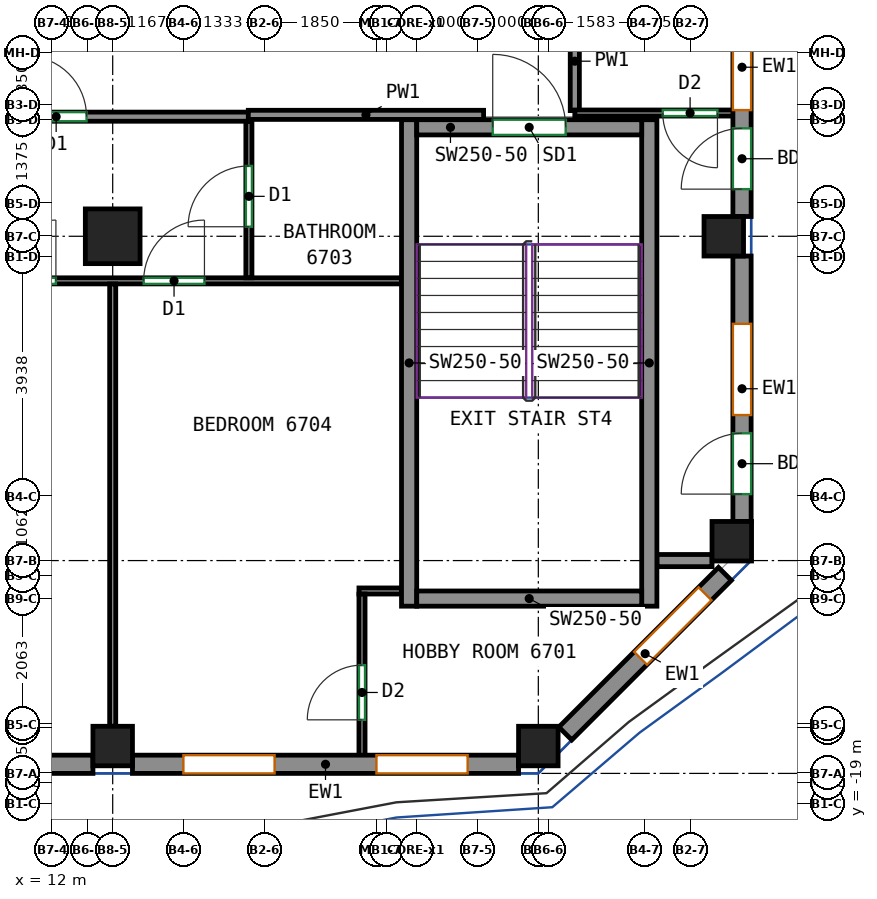
"""IFC4 building model, lengths in metres.
Left out: names, types, materials, properties, quantities, classifications, styles, units other than length and angle.
Written with IfcOpenShell. Run it as: python <this file> out.ifc"""

import sys

from ifc_helpers import new_model, si_unit, direction, frame, frame_2d, origin, origin_2d, place, context, subcontext, project, spatial, rectangle, extrude, source, transform, mapped, element, fill, save


model = new_model("IFC4")
c1 = context("Model", 3, precision=1e-05, world=origin(), true_north=direction((0.0, 1.0)))
c2 = subcontext(c1, "Body", "Model", "MODEL_VIEW")
j1 = project(units=[si_unit("LENGTHUNIT", "METRE"), si_unit("PLANEANGLEUNIT", "RADIAN")], contexts=[c1])
p1 = place(None, origin())
s1 = spatial("IfcSite", under=j1, at=p1, CompositionType="ELEMENT")
p2 = place(p1, origin())
s2 = spatial("IfcBuilding", under=s1, at=p2, CompositionType="ELEMENT")
p3 = place(p2, frame((0.0, 0.0, 273.8)))
s3 = spatial("IfcBuildingStorey", under=s2, at=p3, CompositionType="ELEMENT", Elevation=273.8)
m1 = source(origin(), c2, "Body", "SweptSolid", [
    extrude(rectangle(XDim=0.65, YDim=0.65, at=origin_2d()), origin(), (0.0, 0.0, 1.0), 3.12),
])
p4 = place(p3, frame((13.0, -18.05, 0.0), z_axis=(0.0, 0.0, 1.0), x_axis=(1.0, 0.0, 0.0)))
e1 = element("IfcColumn", 1, at=p4, inside=s3, PredefinedType="COLUMN", context=c2, shape_type="MappedRepresentation", body=[
    mapped(m1, transform((0.0, 0.0, 0.0))),
])
m2 = source(origin(), c2, "Body", "SweptSolid", [
    extrude(rectangle(XDim=0.9, YDim=0.9, at=origin_2d()), origin(), (0.0, 0.0, 1.0), 3.12),
])
p5 = place(p3, frame((13.0, -9.667, 0.0), z_axis=(0.0, 0.0, 1.0), x_axis=(1.0, 0.0, 0.0)))
e2 = element("IfcColumn", 2, at=p5, inside=s3, PredefinedType="COLUMN", context=c2, shape_type="MappedRepresentation", body=[
    mapped(m2, transform((0.0, 0.0, 0.0))),
])
for number, where, z_axis, x_axis in (
    (3, (20.0, -18.05, 0.0), (0.0, 0.0, 1.0), (1.0, 0.0, 0.0)),
    (4, (23.05, -9.667, 0.0), (0.0, 0.0, 1.0), (1.0, 0.0, 0.0)),
    (5, (23.182, -14.682, 0.0), (0.0, 0.0, 1.0), (1.0, 0.0, 0.0)),
):
    element("IfcColumn", number, at=place(p3, frame(where, z_axis=z_axis, x_axis=x_axis)), inside=s3, PredefinedType="COLUMN", context=c2, shape_type="MappedRepresentation", body=[
        mapped(m1, transform((0.0, 0.0, 0.0))),
    ])
m3 = source(origin(), c2, "Body", "SweptSolid", [
    extrude(rectangle(XDim=8.0, YDim=0.25, at=frame_2d((4.0, 0.0))), origin(), (0.0, 0.0, 1.0), 3.12),
])
for number, where, z_axis, x_axis in (
    (6, (17.875, -15.75, 0.0), (0.0, 0.0, 1.0), (0.0, 1.0, 0.0)),
    (7, (21.825, -15.75, 0.0), (0.0, 0.0, 1.0), (0.0, 1.0, 0.0)),
):
    element("IfcWall", number, at=place(p3, frame(where, z_axis=z_axis, x_axis=x_axis)), inside=s3, PredefinedType="SHEAR", context=c2, shape_type="MappedRepresentation", body=[
        mapped(m3, transform((0.0, 0.0, 0.0))),
    ])
m4 = source(origin(), c2, "Body", "SweptSolid", [
    extrude(rectangle(XDim=3.7, YDim=0.25, at=frame_2d((1.85, 0.0))), origin(), (0.0, 0.0, 1.0), 3.12),
])
p6 = place(p3, frame((18.0, -15.625, 0.0), z_axis=(0.0, 0.0, 1.0), x_axis=(1.0, 0.0, 0.0)))
e8 = element("IfcWall", 8, at=p6, inside=s3, PredefinedType="SHEAR", context=c2, shape_type="MappedRepresentation", body=[
    mapped(m4, transform((0.0, 0.0, 0.0))),
])
p7 = place(p3, frame((18.0, -7.875, 0.0), z_axis=(0.0, 0.0, 1.0), x_axis=(1.0, 0.0, 0.0)))
e9 = element("IfcWall", 9, at=p7, inside=s3, PredefinedType="SHEAR", context=c2, shape_type="MappedRepresentation", body=[
    mapped(m4, transform((0.0, 0.0, 0.0))),
])
p8 = place(p7, frame((1.25, 0.0, 0.0)))
e10 = element("IfcOpeningElement", 10, at=p8, cuts=e9, PredefinedType="OPENING", context=c2, shape_type="SweptSolid", body=[
    extrude(rectangle(XDim=1.2, YDim=2.1, at=frame_2d((0.6, 1.05))), frame((0.0, 0.135, 0.0), z_axis=(0.0, -1.0, 0.0), x_axis=(1.0, 0.0, 0.0)), (0.0, 0.0, 1.0), 0.27),
])
m5 = source(origin(), c2, "Body", "SweptSolid", [
    extrude(rectangle(XDim=6.35, YDim=0.3, at=frame_2d((3.175, 0.0))), origin(), (0.0, 0.0, 1.0), 3.12),
])
p9 = place(p3, frame((6.325, -18.35, 0.0), z_axis=(0.0, 0.0, 1.0), x_axis=(1.0, 0.0, 0.0)))
e11 = element("IfcWall", 11, at=p9, inside=s3, PredefinedType="SOLIDWALL", context=c2, shape_type="MappedRepresentation", body=[
    mapped(m5, transform((0.0, 0.0, 0.0))),
])
p10 = place(p9, frame((0.837, 0.0, 0.8)))
e12 = element("IfcOpeningElement", 12, at=p10, cuts=e11, PredefinedType="OPENING", context=c2, shape_type="SweptSolid", body=[
    extrude(rectangle(XDim=1.5, YDim=2.05, at=frame_2d((0.75, 1.025))), frame((0.0, 0.16, 0.0), z_axis=(0.0, -1.0, 0.0), x_axis=(1.0, 0.0, 0.0)), (0.0, 0.0, 1.0), 0.32),
])
p11 = place(p9, frame((4.012, 0.0, 0.8)))
e13 = element("IfcOpeningElement", 13, at=p11, cuts=e11, PredefinedType="OPENING", context=c2, shape_type="SweptSolid", body=[
    extrude(rectangle(XDim=1.5, YDim=2.05, at=frame_2d((0.75, 1.025))), frame((0.0, 0.16, 0.0), z_axis=(0.0, -1.0, 0.0), x_axis=(1.0, 0.0, 0.0)), (0.0, 0.0, 1.0), 0.32),
])
p12 = place(p3, frame((13.325, -18.35, 0.0), z_axis=(0.0, 0.0, 1.0), x_axis=(1.0, 0.0, 0.0)))
e14 = element("IfcWall", 14, at=p12, inside=s3, PredefinedType="SOLIDWALL", context=c2, shape_type="MappedRepresentation", body=[
    mapped(m5, transform((0.0, 0.0, 0.0))),
])
p13 = place(p12, frame((0.837, 0.0, 0.8)))
e15 = element("IfcOpeningElement", 15, at=p13, cuts=e14, PredefinedType="OPENING", context=c2, shape_type="SweptSolid", body=[
    extrude(rectangle(XDim=1.5, YDim=2.05, at=frame_2d((0.75, 1.025))), frame((0.0, 0.16, 0.0), z_axis=(0.0, -1.0, 0.0), x_axis=(1.0, 0.0, 0.0)), (0.0, 0.0, 1.0), 0.32),
])
p14 = place(p12, frame((4.012, 0.0, 0.8)))
e16 = element("IfcOpeningElement", 16, at=p14, cuts=e14, PredefinedType="OPENING", context=c2, shape_type="SweptSolid", body=[
    extrude(rectangle(XDim=1.5, YDim=2.05, at=frame_2d((0.75, 1.025))), frame((0.0, 0.16, 0.0), z_axis=(0.0, -1.0, 0.0), x_axis=(1.0, 0.0, 0.0)), (0.0, 0.0, 1.0), 0.32),
])
m6 = source(origin(), c2, "Body", "SweptSolid", [
    extrude(rectangle(XDim=3.712, YDim=0.3, at=frame_2d((1.856, 0.0))), origin(), (0.0, 0.0, 1.0), 3.12),
])
p15 = place(p3, frame((20.444, -17.844, 0.0), z_axis=(0.0, 0.0, 1.0), x_axis=(0.707106781187, 0.707106781187, 0.0)))
e17 = element("IfcWall", 17, at=p15, inside=s3, PredefinedType="SOLIDWALL", context=c2, shape_type="MappedRepresentation", body=[
    mapped(m6, transform((0.0, 0.0, 0.0))),
])
p16 = place(p15, frame((1.75, 0.0, 0.8)))
e18 = element("IfcOpeningElement", 18, at=p16, cuts=e17, PredefinedType="OPENING", context=c2, shape_type="SweptSolid", body=[
    extrude(rectangle(XDim=1.5, YDim=2.05, at=frame_2d((0.75, 1.025))), frame((0.0, 0.16, 0.0), z_axis=(0.0, -1.0, 0.0), x_axis=(1.0, 0.0, 0.0)), (0.0, 0.0, 1.0), 0.32),
])
m7 = source(origin(), c2, "Body", "SweptSolid", [
    extrude(rectangle(XDim=4.365, YDim=0.3, at=frame_2d((2.183, 0.0))), origin(), (0.0, 0.0, 1.0), 3.12),
])
p17 = place(p3, frame((23.35, -14.357, 0.0), z_axis=(0.0, 0.0, 1.0), x_axis=(0.0, 1.0, 0.0)))
e19 = element("IfcWall", 19, at=p17, inside=s3, PredefinedType="SOLIDWALL", context=c2, shape_type="MappedRepresentation", body=[
    mapped(m7, transform((0.0, 0.0, 0.0))),
])
p18 = place(p17, frame((1.75, 0.0, 0.8)))
e20 = element("IfcOpeningElement", 20, at=p18, cuts=e19, PredefinedType="OPENING", context=c2, shape_type="SweptSolid", body=[
    extrude(rectangle(XDim=1.5, YDim=2.05, at=frame_2d((0.75, 1.025))), frame((0.0, 0.16, 0.0), z_axis=(0.0, -1.0, 0.0), x_axis=(1.0, 0.0, 0.0)), (0.0, 0.0, 1.0), 0.32),
])
p19 = place(p17, frame((0.45, 0.0, 0.0)))
e21 = element("IfcOpeningElement", 21, at=p19, cuts=e19, PredefinedType="OPENING", context=c2, shape_type="SweptSolid", body=[
    extrude(rectangle(XDim=1.0, YDim=2.1, at=frame_2d((0.5, 1.05))), frame((0.0, 0.16, 0.0), z_axis=(0.0, -1.0, 0.0), x_axis=(1.0, 0.0, 0.0)), (0.0, 0.0, 1.0), 0.32),
])
m8 = source(origin(), c2, "Body", "SweptSolid", [
    extrude(rectangle(XDim=8.184, YDim=0.3, at=frame_2d((4.092, 0.0))), origin(), (0.0, 0.0, 1.0), 3.12),
])
p20 = place(p3, frame((23.35, -9.342, 0.0), z_axis=(0.0, 0.0, 1.0), x_axis=(0.0, 1.0, 0.0)))
e22 = element("IfcWall", 22, at=p20, inside=s3, PredefinedType="SOLIDWALL", context=c2, shape_type="MappedRepresentation", body=[
    mapped(m8, transform((0.0, 0.0, 0.0))),
])
p21 = place(p20, frame((1.75, 0.0, 0.8)))
e23 = element("IfcOpeningElement", 23, at=p21, cuts=e22, PredefinedType="OPENING", context=c2, shape_type="SweptSolid", body=[
    extrude(rectangle(XDim=1.5, YDim=2.05, at=frame_2d((0.75, 1.025))), frame((0.0, 0.16, 0.0), z_axis=(0.0, -1.0, 0.0), x_axis=(1.0, 0.0, 0.0)), (0.0, 0.0, 1.0), 0.32),
])
p22 = place(p20, frame((0.45, 0.0, 0.0)))
e24 = element("IfcOpeningElement", 24, at=p22, cuts=e22, PredefinedType="OPENING", context=c2, shape_type="SweptSolid", body=[
    extrude(rectangle(XDim=1.0, YDim=2.1, at=frame_2d((0.5, 1.05))), frame((0.0, 0.16, 0.0), z_axis=(0.0, -1.0, 0.0), x_axis=(1.0, 0.0, 0.0)), (0.0, 0.0, 1.0), 0.32),
])
p23 = place(p20, frame((5.842, 0.0, 0.8)))
e25 = element("IfcOpeningElement", 25, at=p23, cuts=e22, PredefinedType="OPENING", context=c2, shape_type="SweptSolid", body=[
    extrude(rectangle(XDim=1.5, YDim=2.05, at=frame_2d((0.75, 1.025))), frame((0.0, 0.16, 0.0), z_axis=(0.0, -1.0, 0.0), x_axis=(1.0, 0.0, 0.0)), (0.0, 0.0, 1.0), 0.32),
])
p24 = place(p20, frame((4.542, 0.0, 0.0)))
e26 = element("IfcOpeningElement", 26, at=p24, cuts=e22, PredefinedType="OPENING", context=c2, shape_type="SweptSolid", body=[
    extrude(rectangle(XDim=1.0, YDim=2.1, at=frame_2d((0.5, 1.05))), frame((0.0, 0.16, 0.0), z_axis=(0.0, -1.0, 0.0), x_axis=(1.0, 0.0, 0.0)), (0.0, 0.0, 1.0), 0.32),
])
p25 = place(p3, frame((-4.51, -7.7, 0.0), z_axis=(0.0, 0.0, 1.0), x_axis=(1.0, 0.0, 0.0)))
e27 = element("IfcWall", 27, at=p25, inside=s3, PredefinedType="PARTITIONING", context=c2, shape_type="SweptSolid", body=[
    extrude(rectangle(XDim=19.76, YDim=0.15, at=frame_2d((9.88, 0.0))), origin(), (0.0, 0.0, 1.0), 3.12),
])
p26 = place(p25, frame((3.566, 0.0, 0.0)))
e28 = element("IfcOpeningElement", 28, at=p26, cuts=e27, PredefinedType="OPENING", context=c2, shape_type="SweptSolid", body=[
    extrude(rectangle(XDim=1.0, YDim=2.1, at=frame_2d((0.5, 1.05))), frame((0.0, 0.085, 0.0), z_axis=(0.0, -1.0, 0.0), x_axis=(1.0, 0.0, 0.0)), (0.0, 0.0, 1.0), 0.17),
])
p27 = place(p25, frame((16.08, 0.0, 0.0)))
e29 = element("IfcOpeningElement", 29, at=p27, cuts=e27, PredefinedType="OPENING", context=c2, shape_type="SweptSolid", body=[
    extrude(rectangle(XDim=1.0, YDim=2.1, at=frame_2d((0.5, 1.05))), frame((0.0, 0.085, 0.0), z_axis=(0.0, -1.0, 0.0), x_axis=(1.0, 0.0, 0.0)), (0.0, 0.0, 1.0), 0.17),
])
p28 = place(p3, frame((15.23, -7.67, 0.0), z_axis=(0.0, 0.0, 1.0), x_axis=(1.0, 0.0, 0.0)))
e30 = element("IfcWall", 30, at=p28, inside=s3, PredefinedType="PARTITIONING", context=c2, shape_type="SweptSolid", body=[
    extrude(rectangle(XDim=3.87, YDim=0.15, at=frame_2d((1.935, 0.0))), origin(), (0.0, 0.0, 1.0), 3.12),
])
p29 = place(p3, frame((20.6, -7.6, 0.0), z_axis=(0.0, 0.0, 1.0), x_axis=(0.0, 1.0, 0.0)))
e31 = element("IfcWall", 31, at=p29, inside=s3, PredefinedType="PARTITIONING", context=c2, shape_type="SweptSolid", body=[
    extrude(rectangle(XDim=1.625, YDim=0.15, at=frame_2d((0.812, 0.0))), origin(), (0.0, 0.0, 1.0), 3.12),
])
p30 = place(p3, frame((-4.6, -10.4, 0.0), z_axis=(0.0, 0.0, 1.0), x_axis=(1.0, 0.0, 0.0)))
e32 = element("IfcWall", 32, at=p30, inside=s3, PredefinedType="PARTITIONING", context=c2, shape_type="SweptSolid", body=[
    extrude(rectangle(XDim=22.35, YDim=0.1, at=frame_2d((11.175, 0.0))), origin(), (0.0, 0.0, 1.0), 3.12),
])
p31 = place(p30, frame((3.96, 0.0, 0.0)))
e33 = element("IfcOpeningElement", 33, at=p31, cuts=e32, PredefinedType="OPENING", context=c2, shape_type="SweptSolid", body=[
    extrude(rectangle(XDim=1.0, YDim=2.1, at=frame_2d((0.5, 1.05))), frame((0.0, 0.06, 0.0), z_axis=(0.0, -1.0, 0.0), x_axis=(1.0, 0.0, 0.0)), (0.0, 0.0, 1.0), 0.12),
])
p32 = place(p30, frame((15.666, 0.0, 0.0)))
e34 = element("IfcOpeningElement", 34, at=p32, cuts=e32, PredefinedType="OPENING", context=c2, shape_type="SweptSolid", body=[
    extrude(rectangle(XDim=1.0, YDim=2.1, at=frame_2d((0.5, 1.05))), frame((0.0, 0.06, 0.0), z_axis=(0.0, -1.0, 0.0), x_axis=(1.0, 0.0, 0.0)), (0.0, 0.0, 1.0), 0.12),
])
p33 = place(p30, frame((18.109, 0.0, 0.0)))
e35 = element("IfcOpeningElement", 35, at=p33, cuts=e32, PredefinedType="OPENING", context=c2, shape_type="SweptSolid", body=[
    extrude(rectangle(XDim=1.0, YDim=2.1, at=frame_2d((0.5, 1.05))), frame((0.0, 0.06, 0.0), z_axis=(0.0, -1.0, 0.0), x_axis=(1.0, 0.0, 0.0)), (0.0, 0.0, 1.0), 0.12),
])
p34 = place(p3, frame((15.24, -10.35, 0.0), z_axis=(0.0, 0.0, 1.0), x_axis=(0.0, 1.0, 0.0)))
e36 = element("IfcWall", 36, at=p34, inside=s3, PredefinedType="PARTITIONING", context=c2, shape_type="SweptSolid", body=[
    extrude(rectangle(XDim=2.573, YDim=0.1, at=frame_2d((1.287, 0.0))), origin(), (0.0, 0.0, 1.0), 3.12),
])
p35 = place(p34, frame((0.84, 0.0, 0.0)))
e37 = element("IfcOpeningElement", 37, at=p35, cuts=e36, PredefinedType="OPENING", context=c2, shape_type="SweptSolid", body=[
    extrude(rectangle(XDim=1.0, YDim=2.1, at=frame_2d((0.5, 1.05))), frame((0.0, 0.06, 0.0), z_axis=(0.0, -1.0, 0.0), x_axis=(1.0, 0.0, 0.0)), (0.0, 0.0, 1.0), 0.12),
])
p36 = place(p3, frame((13.0, -17.725, 0.0), z_axis=(0.0, 0.0, 1.0), x_axis=(0.0, 1.0, 0.0)))
e38 = element("IfcWall", 38, at=p36, inside=s3, PredefinedType="PARTITIONING", context=c2, shape_type="SweptSolid", body=[
    extrude(rectangle(XDim=7.273, YDim=0.1, at=frame_2d((3.637, 0.0))), origin(), (0.0, 0.0, 1.0), 3.12),
])
p37 = place(p3, frame((17.05, -15.5, 0.0), z_axis=(0.0, 0.0, 1.0), x_axis=(1.0, 0.0, 0.0)))
e39 = element("IfcWall", 39, at=p37, inside=s3, PredefinedType="PARTITIONING", context=c2, shape_type="SweptSolid", body=[
    extrude(rectangle(XDim=0.7, YDim=0.1, at=frame_2d((0.35, 0.0))), origin(), (0.0, 0.0, 1.0), 3.12),
])
p38 = place(p3, frame((17.1, -18.25, 0.0), z_axis=(0.0, 0.0, 1.0), x_axis=(0.0, 1.0, 0.0)))
e40 = element("IfcWall", 40, at=p38, inside=s3, PredefinedType="PARTITIONING", context=c2, shape_type="SweptSolid", body=[
    extrude(rectangle(XDim=2.7, YDim=0.1, at=frame_2d((1.35, 0.0))), origin(), (0.0, 0.0, 1.0), 3.12),
])
p39 = place(p38, frame((0.631, 0.0, 0.0)))
e41 = element("IfcOpeningElement", 41, at=p39, cuts=e40, PredefinedType="OPENING", context=c2, shape_type="SweptSolid", body=[
    extrude(rectangle(XDim=0.9, YDim=2.1, at=frame_2d((0.45, 1.05))), frame((0.0, 0.06, 0.0), z_axis=(0.0, -1.0, 0.0), x_axis=(1.0, 0.0, 0.0)), (0.0, 0.0, 1.0), 0.12),
])
p40 = place(p3, frame((21.95, -15.0, 0.0), z_axis=(0.0, 0.0, 1.0), x_axis=(1.0, 0.0, 0.0)))
e42 = element("IfcWall", 42, at=p40, inside=s3, PredefinedType="PARTITIONING", context=c2, shape_type="SweptSolid", body=[
    extrude(rectangle(XDim=0.907, YDim=0.2, at=frame_2d((0.454, 0.0))), origin(), (0.0, 0.0, 1.0), 3.12),
])
p41 = place(p3, frame((23.25, -7.64, 0.0), z_axis=(0.0, 0.0, 1.0), x_axis=(-1.0, 0.0, 0.0)))
e43 = element("IfcWall", 43, at=p41, inside=s3, PredefinedType="PARTITIONING", context=c2, shape_type="SweptSolid", body=[
    extrude(rectangle(XDim=2.65, YDim=0.1, at=frame_2d((1.325, 0.0))), origin(), (0.0, 0.0, 1.0), 3.12),
])
p42 = place(p41, frame((0.304, 0.0, 0.0)))
e44 = element("IfcOpeningElement", 44, at=p42, cuts=e43, PredefinedType="OPENING", context=c2, shape_type="SweptSolid", body=[
    extrude(rectangle(XDim=0.9, YDim=2.1, at=frame_2d((0.45, 1.05))), frame((0.0, 0.06, 0.0), z_axis=(0.0, -1.0, 0.0), x_axis=(1.0, 0.0, 0.0)), (0.0, 0.0, 1.0), 0.12),
])
p43 = place(p13, origin())
e45 = element("IfcWindow", 45, at=p43, inside=s3, PartitioningType="SINGLE_PANEL", PredefinedType="WINDOW", context=c2, shape_type="SweptSolid", body=[
    extrude(rectangle(XDim=1.5, YDim=2.05, at=frame_2d((0.75, 1.025))), frame((0.0, 0.03, 0.0), z_axis=(0.0, -1.0, 0.0), x_axis=(1.0, 0.0, 0.0)), (0.0, 0.0, 1.0), 0.06),
])
fill(e15, e45)
p44 = place(p14, origin())
e46 = element("IfcWindow", 46, at=p44, inside=s3, PartitioningType="SINGLE_PANEL", PredefinedType="WINDOW", context=c2, shape_type="SweptSolid", body=[
    extrude(rectangle(XDim=1.5, YDim=2.05, at=frame_2d((0.75, 1.025))), frame((0.0, 0.03, 0.0), z_axis=(0.0, -1.0, 0.0), x_axis=(1.0, 0.0, 0.0)), (0.0, 0.0, 1.0), 0.06),
])
fill(e16, e46)
p45 = place(p16, origin())
e47 = element("IfcWindow", 47, at=p45, inside=s3, PartitioningType="SINGLE_PANEL", PredefinedType="WINDOW", context=c2, shape_type="SweptSolid", body=[
    extrude(rectangle(XDim=1.5, YDim=2.05, at=frame_2d((0.75, 1.025))), frame((0.0, 0.03, 0.0), z_axis=(0.0, -1.0, 0.0), x_axis=(1.0, 0.0, 0.0)), (0.0, 0.0, 1.0), 0.06),
])
fill(e18, e47)
p46 = place(p18, origin())
e48 = element("IfcWindow", 48, at=p46, inside=s3, PartitioningType="SINGLE_PANEL", PredefinedType="WINDOW", context=c2, shape_type="SweptSolid", body=[
    extrude(rectangle(XDim=1.5, YDim=2.05, at=frame_2d((0.75, 1.025))), frame((0.0, 0.03, 0.0), z_axis=(0.0, -1.0, 0.0), x_axis=(1.0, 0.0, 0.0)), (0.0, 0.0, 1.0), 0.06),
])
fill(e20, e48)
p47 = place(p19, origin())
e49 = element("IfcDoor", 49, at=p47, inside=s3, OperationType="SINGLE_SWING_LEFT", PredefinedType="DOOR", context=c2, shape_type="SweptSolid", body=[
    extrude(rectangle(XDim=1.0, YDim=2.1, at=frame_2d((0.5, 1.05))), frame((0.0, 0.025, 0.0), z_axis=(0.0, -1.0, 0.0), x_axis=(1.0, 0.0, 0.0)), (0.0, 0.0, 1.0), 0.05),
])
fill(e21, e49)
p48 = place(p21, origin())
e50 = element("IfcWindow", 50, at=p48, inside=s3, PartitioningType="SINGLE_PANEL", PredefinedType="WINDOW", context=c2, shape_type="SweptSolid", body=[
    extrude(rectangle(XDim=1.5, YDim=2.05, at=frame_2d((0.75, 1.025))), frame((0.0, 0.03, 0.0), z_axis=(0.0, -1.0, 0.0), x_axis=(1.0, 0.0, 0.0)), (0.0, 0.0, 1.0), 0.06),
])
fill(e23, e50)
p49 = place(p22, origin())
e51 = element("IfcDoor", 51, at=p49, inside=s3, OperationType="SINGLE_SWING_LEFT", PredefinedType="DOOR", context=c2, shape_type="SweptSolid", body=[
    extrude(rectangle(XDim=1.0, YDim=2.1, at=frame_2d((0.5, 1.05))), frame((0.0, 0.025, 0.0), z_axis=(0.0, -1.0, 0.0), x_axis=(1.0, 0.0, 0.0)), (0.0, 0.0, 1.0), 0.05),
])
fill(e24, e51)
p50 = place(p8, origin())
e52 = element("IfcDoor", 52, at=p50, inside=s3, OperationType="DOUBLE_DOOR_SINGLE_SWING", PredefinedType="DOOR", context=c2, shape_type="SweptSolid", body=[
    extrude(rectangle(XDim=1.2, YDim=2.1, at=frame_2d((0.6, 1.05))), frame((0.0, 0.025, 0.0), z_axis=(0.0, -1.0, 0.0), x_axis=(1.0, 0.0, 0.0)), (0.0, 0.0, 1.0), 0.05),
])
fill(e10, e52)
p51 = place(p39, origin())
e53 = element("IfcDoor", 53, at=p51, inside=s3, OperationType="SINGLE_SWING_LEFT", PredefinedType="DOOR", context=c2, shape_type="SweptSolid", body=[
    extrude(rectangle(XDim=0.9, YDim=2.1, at=frame_2d((0.45, 1.05))), frame((0.0, 0.025, 0.0), z_axis=(0.0, -1.0, 0.0), x_axis=(1.0, 0.0, 0.0)), (0.0, 0.0, 1.0), 0.05),
])
fill(e41, e53)
p52 = place(p32, origin())
e54 = element("IfcDoor", 54, at=p52, inside=s3, OperationType="SINGLE_SWING_RIGHT", PredefinedType="DOOR", context=c2, shape_type="SweptSolid", body=[
    extrude(rectangle(XDim=1.0, YDim=2.1, at=frame_2d((0.5, 1.05))), frame((0.0, 0.025, 0.0), z_axis=(0.0, -1.0, 0.0), x_axis=(1.0, 0.0, 0.0)), (0.0, 0.0, 1.0), 0.05),
])
fill(e34, e54)
p53 = place(p33, origin())
e55 = element("IfcDoor", 55, at=p53, inside=s3, OperationType="SINGLE_SWING_RIGHT", PredefinedType="DOOR", context=c2, shape_type="SweptSolid", body=[
    extrude(rectangle(XDim=1.0, YDim=2.1, at=frame_2d((0.5, 1.05))), frame((0.0, 0.025, 0.0), z_axis=(0.0, -1.0, 0.0), x_axis=(1.0, 0.0, 0.0)), (0.0, 0.0, 1.0), 0.05),
])
fill(e35, e55)
p54 = place(p35, origin())
e56 = element("IfcDoor", 56, at=p54, inside=s3, OperationType="SINGLE_SWING_LEFT", PredefinedType="DOOR", context=c2, shape_type="SweptSolid", body=[
    extrude(rectangle(XDim=1.0, YDim=2.1, at=frame_2d((0.5, 1.05))), frame((0.0, 0.025, 0.0), z_axis=(0.0, -1.0, 0.0), x_axis=(1.0, 0.0, 0.0)), (0.0, 0.0, 1.0), 0.05),
])
fill(e37, e56)
p55 = place(p27, origin())
e57 = element("IfcDoor", 57, at=p55, inside=s3, OperationType="SINGLE_SWING_LEFT", PredefinedType="DOOR", context=c2, shape_type="SweptSolid", body=[
    extrude(rectangle(XDim=1.0, YDim=2.1, at=frame_2d((0.5, 1.05))), frame((0.0, 0.025, 0.0), z_axis=(0.0, -1.0, 0.0), x_axis=(1.0, 0.0, 0.0)), (0.0, 0.0, 1.0), 0.05),
])
fill(e29, e57)
p56 = place(p42, origin())
e58 = element("IfcDoor", 58, at=p56, inside=s3, OperationType="SINGLE_SWING_LEFT", PredefinedType="DOOR", context=c2, shape_type="SweptSolid", body=[
    extrude(rectangle(XDim=0.9, YDim=2.1, at=frame_2d((0.45, 1.05))), frame((0.0, 0.025, 0.0), z_axis=(0.0, -1.0, 0.0), x_axis=(1.0, 0.0, 0.0)), (0.0, 0.0, 1.0), 0.05),
])
fill(e44, e58)
save(model, sys.argv[1])
